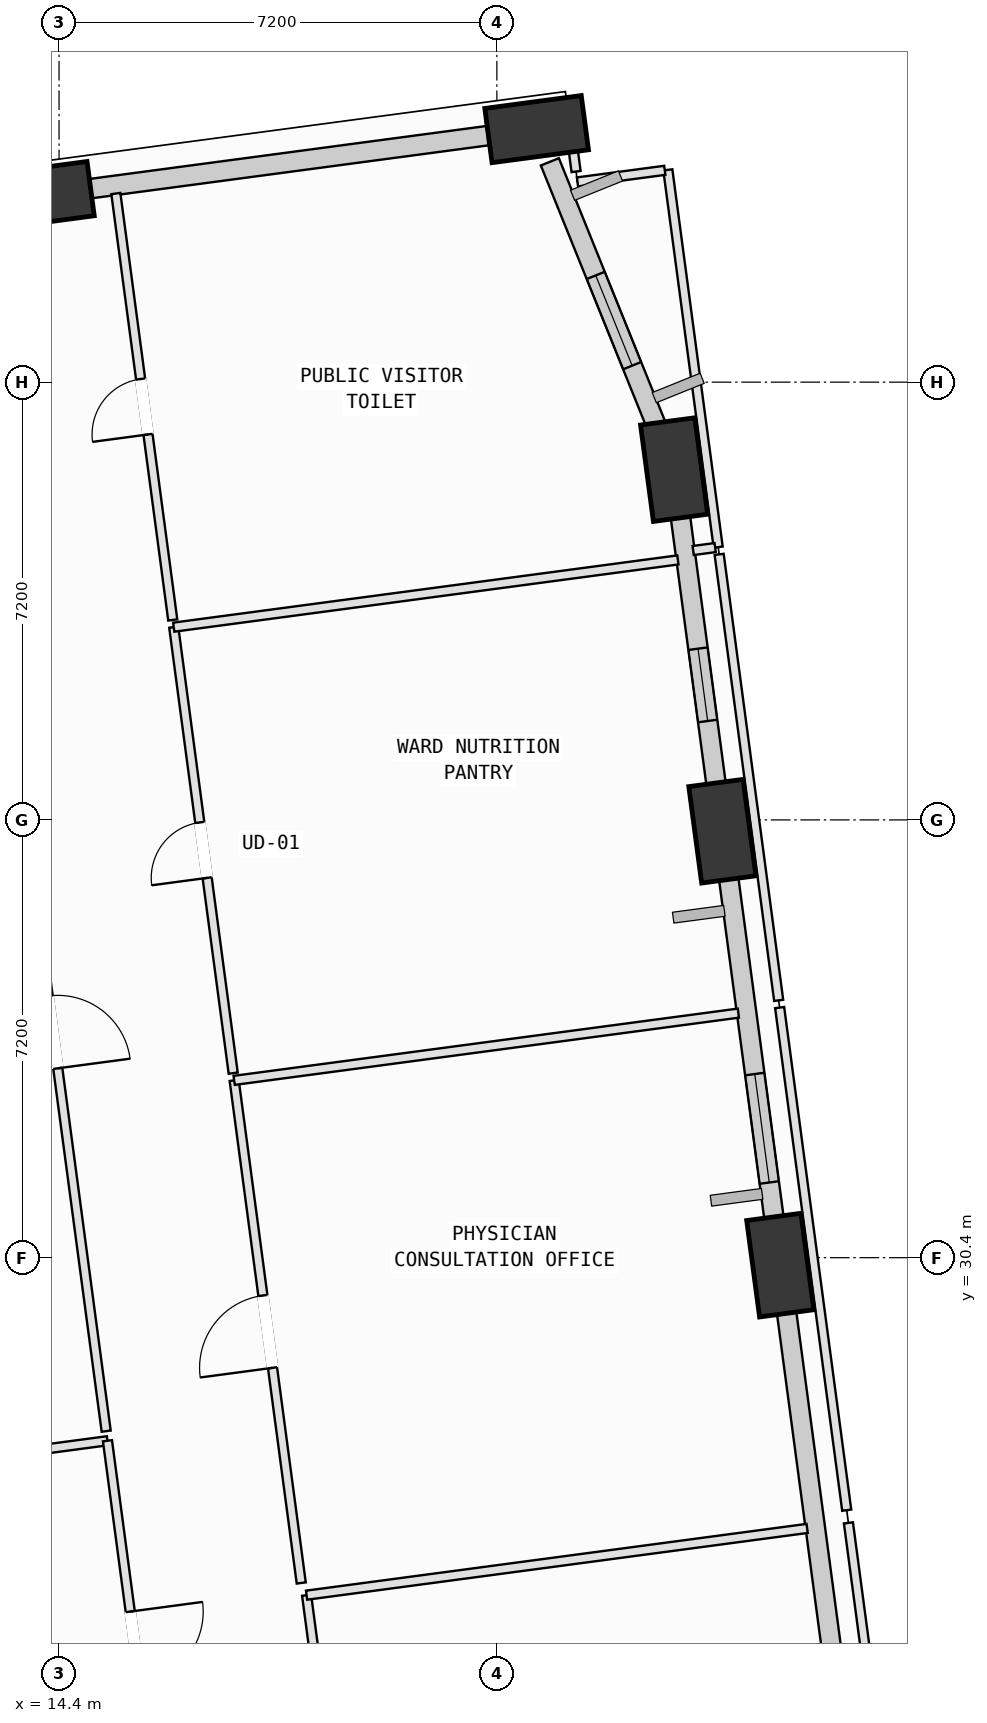
"""IFC4 building model, lengths in metres.
Left out: names, types, materials, properties, quantities, classifications, styles, units other than length and angle.
Written with IfcOpenShell. Run it as: python <this file> out.ifc"""

import sys

from ifc_helpers import new_model, si_unit, direction, frame, frame_2d, origin, origin_2d, place, context, subcontext, project, spatial, rectangle, extrude, element, fill, save


model = new_model("IFC4")
c1 = context("Model", 3, precision=1e-05, world=origin(), true_north=direction((0.0, 1.0)))
c2 = subcontext(c1, "Body", "Model", "MODEL_VIEW")
j1 = project(units=[si_unit("LENGTHUNIT", "METRE"), si_unit("PLANEANGLEUNIT", "RADIAN")], contexts=[c1])
p1 = place(None, origin())
s1 = spatial("IfcSite", under=j1, at=p1, CompositionType="ELEMENT")
p2 = place(p1, origin())
s2 = spatial("IfcBuilding", under=s1, at=p2, CompositionType="ELEMENT")
p3 = place(p2, frame((0.0, 0.0, 55.0)))
s3 = spatial("IfcBuildingStorey", under=s2, at=p3, CompositionType="ELEMENT", Elevation=55.0)
p4 = place(p3, frame((26.261, 30.277, 0.002), z_axis=(-0.022402943156, -0.030582764363, 0.999281142953), x_axis=(0.478639719495, 0.877206908707, 0.037577363367)))
e1 = element("IfcColumn", 1, at=p4, inside=s3, PredefinedType="COLUMN", context=c2, shape_type="SweptSolid", body=[
    extrude(rectangle(XDim=1.6, YDim=0.9, at=origin_2d()), origin(), (0.0, 0.0, 1.0), 4.0),
])
p5 = place(p3, frame((25.309, 37.414, 0.002), z_axis=(-0.051944682032, -0.034751723895, 0.998045123076), x_axis=(0.748695807383, 0.660012861468, 0.061948451981)))
e2 = element("IfcColumn", 2, at=p5, inside=s3, PredefinedType="COLUMN", context=c2, shape_type="SweptSolid", body=[
    extrude(rectangle(XDim=1.6, YDim=0.9, at=origin_2d()), origin(), (0.0, 0.0, 1.0), 4.004),
])
p6 = place(p3, frame((24.515, 43.362, 0.002), z_axis=(-0.076324130857, -0.038162065429, 0.99635248974), x_axis=(0.824189501878, 0.559961890476, 0.084583368398)))
e3 = element("IfcColumn", 3, at=p6, inside=s3, PredefinedType="COLUMN", context=c2, shape_type="SweptSolid", body=[
    extrude(rectangle(XDim=1.6, YDim=0.9, at=origin_2d()), origin(), (0.0, 0.0, 1.0), 4.011),
])
p7 = place(p3, frame((22.255, 48.962, 0.002), z_axis=(-0.099150741253, -0.047541353583, 0.9939360896), x_axis=(0.547089007496, -0.836948101272, 0.014542821377)))
e4 = element("IfcColumn", 4, at=p7, inside=s3, PredefinedType="COLUMN", context=c2, shape_type="SweptSolid", body=[
    extrude(rectangle(XDim=1.6, YDim=0.9, at=origin_2d()), origin(), (0.0, 0.0, 1.0), 4.021),
])
p8 = place(p3, frame((14.127, 47.877, 0.002), z_axis=(-0.0942550357, -0.080919918109, 0.992253977114), x_axis=(0.745242646619, -0.666590927141, 0.016429653498)))
e5 = element("IfcColumn", 5, at=p8, inside=s3, PredefinedType="COLUMN", context=c2, shape_type="SweptSolid", body=[
    extrude(rectangle(XDim=1.6, YDim=0.9, at=origin_2d()), origin(), (0.0, 0.0, 1.0), 4.028),
])
p9 = place(p3, frame((27.213, 23.144, 0.0), z_axis=(0.0, 0.0, 1.0), x_axis=(-0.132264032009, 0.991214520594, 0.0)))
e6 = element("IfcWall", 6, at=p9, inside=s3, PredefinedType="SOLIDWALL", context=c2, shape_type="SweptSolid", body=[
    extrude(rectangle(XDim=6.536, YDim=0.32, at=frame_2d((3.268, 0.0))), origin(), (0.0, 0.0, 1.0), 3.165),
])
p10 = place(p3, frame((26.188, 30.823, 0.0), z_axis=(0.0, 0.0, 1.0), x_axis=(-0.132238391297, 0.991217941659, 0.0)))
e7 = element("IfcWall", 7, at=p10, inside=s3, PredefinedType="SOLIDWALL", context=c2, shape_type="SweptSolid", body=[
    extrude(rectangle(XDim=5.997, YDim=0.32, at=frame_2d((2.998, 0.0))), origin(), (0.0, 0.0, 1.0), 3.165),
])
p11 = place(p10, frame((0.82, 0.0, 0.75)))
e8 = element("IfcOpeningElement", 8, at=p11, cuts=e7, PredefinedType="OPENING", context=c2, shape_type="SweptSolid", body=[
    extrude(rectangle(XDim=1.8, YDim=2.05, at=frame_2d((0.9, 1.025))), frame((0.0, 0.17, 0.0), z_axis=(0.0, -1.0, 0.0), x_axis=(1.0, 0.0, 0.0)), (0.0, 0.0, 1.0), 0.34),
])
p12 = place(p3, frame((25.237, 37.952, 0.0), z_axis=(0.0, 0.0, 1.0), x_axis=(-0.132253369946, 0.991215943242, 0.0)))
e9 = element("IfcWall", 9, at=p12, inside=s3, PredefinedType="SOLIDWALL", context=c2, shape_type="SweptSolid", body=[
    extrude(rectangle(XDim=4.816, YDim=0.32, at=frame_2d((2.408, 0.0))), origin(), (0.0, 0.0, 1.0), 3.165),
])
p13 = place(p12, frame((1.286, 0.0, 0.75)))
e10 = element("IfcOpeningElement", 10, at=p13, cuts=e9, PredefinedType="OPENING", context=c2, shape_type="SweptSolid", body=[
    extrude(rectangle(XDim=1.2, YDim=1.75, at=frame_2d((0.6, 0.875))), frame((0.0, 0.17, 0.0), z_axis=(0.0, -1.0, 0.0), x_axis=(1.0, 0.0, 0.0)), (0.0, 0.0, 1.0), 0.34),
])
p14 = place(p3, frame((22.472, 48.424, 0.0), z_axis=(0.0, 0.0, 1.0), x_axis=(0.374316080682, -0.927301176395, 0.0)))
e11 = element("IfcWall", 11, at=p14, inside=s3, PredefinedType="SOLIDWALL", context=c2, shape_type="SweptSolid", body=[
    extrude(rectangle(XDim=4.889, YDim=0.32, at=frame_2d((2.445, 0.0))), origin(), (0.0, 0.0, 1.0), 3.165),
])
p15 = place(p14, frame((2.015, 0.0, 0.75)))
e12 = element("IfcOpeningElement", 12, at=p15, cuts=e11, PredefinedType="OPENING", context=c2, shape_type="SweptSolid", body=[
    extrude(rectangle(XDim=1.6, YDim=1.95, at=frame_2d((0.8, 0.975))), frame((0.0, 0.17, 0.0), z_axis=(0.0, -1.0, 0.0), x_axis=(1.0, 0.0, 0.0)), (0.0, 0.0, 1.0), 0.34),
])
p16 = place(p3, frame((14.506, 47.928, 0.0), z_axis=(0.0, 0.0, 1.0), x_axis=(0.991218459324, 0.132234510981, 0.0)))
e13 = element("IfcWall", 13, at=p16, inside=s3, PredefinedType="SOLIDWALL", context=c2, shape_type="SweptSolid", body=[
    extrude(rectangle(XDim=7.003, YDim=0.32, at=frame_2d((3.501, 0.0))), origin(), (0.0, 0.0, 1.0), 3.165),
])
p17 = place(p3, frame((5.864, 26.143, 0.0), z_axis=(0.0, 0.0, 1.0), x_axis=(0.991205918813, 0.132328479586, 0.0)))
e14 = element("IfcWall", 14, at=p17, inside=s3, PredefinedType="PARTITIONING", context=c2, shape_type="SweptSolid", body=[
    extrude(rectangle(XDim=9.415, YDim=0.15, at=frame_2d((4.708, 0.0))), origin(), (0.0, 0.0, 1.0), 3.78),
])
p18 = place(p3, frame((15.196, 27.389, 0.0), z_axis=(0.0, 0.0, 1.0), x_axis=(0.132180016539, -0.991225727687, 0.0)))
e15 = element("IfcWall", 15, at=p18, inside=s3, PredefinedType="PARTITIONING", context=c2, shape_type="SweptSolid", body=[
    extrude(rectangle(XDim=6.869, YDim=0.15, at=frame_2d((3.435, 0.0))), origin(), (0.0, 0.0, 1.0), 3.78),
])
p19 = place(p18, frame((2.835, 0.0, 0.0)))
e16 = element("IfcOpeningElement", 16, at=p19, cuts=e15, PredefinedType="OPENING", context=c2, shape_type="SweptSolid", body=[
    extrude(rectangle(XDim=1.2, YDim=2.15, at=frame_2d((0.6, 1.075))), frame((0.0, 0.085, 0.0), z_axis=(0.0, -1.0, 0.0), x_axis=(1.0, 0.0, 0.0)), (0.0, 0.0, 1.0), 0.17),
])
p20 = place(p3, frame((13.424, 40.671, 0.0), z_axis=(0.0, 0.0, 1.0), x_axis=(0.132248267647, -0.991216624005, 0.0)))
e17 = element("IfcWall", 17, at=p20, inside=s3, PredefinedType="PARTITIONING", context=c2, shape_type="SweptSolid", body=[
    extrude(rectangle(XDim=13.24, YDim=0.15, at=frame_2d((6.62, 0.0))), origin(), (0.0, 0.0, 1.0), 2.865),
])
p21 = place(p20, frame((6.02, 0.0, 0.0)))
e18 = element("IfcOpeningElement", 18, at=p21, cuts=e17, PredefinedType="OPENING", context=c2, shape_type="SweptSolid", body=[
    extrude(rectangle(XDim=1.2, YDim=2.15, at=frame_2d((0.6, 1.075))), frame((0.0, 0.085, 0.0), z_axis=(0.0, -1.0, 0.0), x_axis=(1.0, 0.0, 0.0)), (0.0, 0.0, 1.0), 0.17),
])
p22 = place(p3, frame((19.04, 20.58, 0.0), z_axis=(0.0, 0.0, 1.0), x_axis=(-0.132137728125, 0.991231365931, 0.0)))
e19 = element("IfcWall", 19, at=p22, inside=s3, PredefinedType="PARTITIONING", context=c2, shape_type="SweptSolid", body=[
    extrude(rectangle(XDim=4.307, YDim=0.15, at=frame_2d((2.153, 0.0))), origin(), (0.0, 0.0, 1.0), 3.78),
])
p23 = place(p3, frame((18.471, 24.849, 0.0), z_axis=(0.0, 0.0, 1.0), x_axis=(0.991223021829, 0.13220030634, 0.0)))
e20 = element("IfcWall", 20, at=p23, inside=s3, PredefinedType="PARTITIONING", context=c2, shape_type="SweptSolid", body=[
    extrude(rectangle(XDim=8.305, YDim=0.15, at=frame_2d((4.152, 0.0))), origin(), (0.0, 0.0, 1.0), 3.78),
])
p24 = place(p3, frame((27.382, 26.038, 0.0), z_axis=(0.0, 0.0, 1.0), x_axis=(0.132253490455, -0.991215927163, 0.0)))
e21 = element("IfcWall", 21, at=p24, inside=s3, PredefinedType="PARTITIONING", context=c2, shape_type="SweptSolid", body=[
    extrude(rectangle(XDim=2.85, YDim=0.15, at=frame_2d((1.425, 0.0))), origin(), (0.0, 0.0, 1.0), 3.78),
])
p25 = place(p3, frame((27.759, 23.213, 0.0), z_axis=(0.0, 0.0, 1.0), x_axis=(0.991206665462, 0.132322886697, 0.0)))
e22 = element("IfcWall", 22, at=p25, inside=s3, PredefinedType="PARTITIONING", context=c2, shape_type="SweptSolid", body=[
    extrude(rectangle(XDim=14.367, YDim=0.15, at=frame_2d((7.184, 0.0))), origin(), (0.0, 0.0, 1.0), 3.165),
])
p26 = place(p3, frame((18.383, 25.05, 0.0), z_axis=(0.0, 0.0, 1.0), x_axis=(-0.132271109001, 0.991213576241, 0.0)))
e23 = element("IfcWall", 23, at=p26, inside=s3, PredefinedType="PARTITIONING", context=c2, shape_type="SweptSolid", body=[
    extrude(rectangle(XDim=8.339, YDim=0.15, at=frame_2d((4.169, 0.0))), origin(), (0.0, 0.0, 1.0), 3.78),
])
p27 = place(p26, frame((3.57, 0.0, 0.0)))
e24 = element("IfcOpeningElement", 24, at=p27, cuts=e23, PredefinedType="OPENING", context=c2, shape_type="SweptSolid", body=[
    extrude(rectangle(XDim=1.2, YDim=2.15, at=frame_2d((0.6, 1.075))), frame((0.0, 0.085, 0.0), z_axis=(0.0, -1.0, 0.0), x_axis=(1.0, 0.0, 0.0)), (0.0, 0.0, 1.0), 0.17),
])
p28 = place(p3, frame((17.28, 33.316, 0.0), z_axis=(0.0, 0.0, 1.0), x_axis=(0.991218467397, 0.13223445047, 0.0)))
e25 = element("IfcWall", 25, at=p28, inside=s3, PredefinedType="PARTITIONING", context=c2, shape_type="SweptSolid", body=[
    extrude(rectangle(XDim=8.365, YDim=0.15, at=frame_2d((4.183, 0.0))), origin(), (0.0, 0.0, 1.0), 3.78),
])
p29 = place(p3, frame((26.251, 34.513, 0.0), z_axis=(0.0, 0.0, 1.0), x_axis=(0.132271109001, -0.991213576241, 0.0)))
e26 = element("IfcWall", 26, at=p29, inside=s3, PredefinedType="PARTITIONING", context=c2, shape_type="SweptSolid", body=[
    extrude(rectangle(XDim=8.339, YDim=0.15, at=frame_2d((4.169, 0.0))), origin(), (0.0, 0.0, 1.0), 3.78),
])
p30 = place(p3, frame((17.264, 33.435, 0.0), z_axis=(0.0, 0.0, 1.0), x_axis=(-0.132168042254, 0.991227324385, 0.0)))
e27 = element("IfcWall", 27, at=p30, inside=s3, PredefinedType="PARTITIONING", context=c2, shape_type="SweptSolid", body=[
    extrude(rectangle(XDim=7.4, YDim=0.15, at=frame_2d((3.7, 0.0))), origin(), (0.0, 0.0, 1.0), 3.78),
])
p31 = place(p30, frame((3.24, 0.0, 0.0)))
e28 = element("IfcOpeningElement", 28, at=p31, cuts=e27, PredefinedType="OPENING", context=c2, shape_type="SweptSolid", body=[
    extrude(rectangle(XDim=0.92, YDim=2.1, at=frame_2d((0.46, 1.05))), frame((0.0, 0.085, 0.0), z_axis=(0.0, -1.0, 0.0), x_axis=(1.0, 0.0, 0.0)), (0.0, 0.0, 1.0), 0.17),
])
p32 = place(p3, frame((16.286, 40.77, 0.0), z_axis=(0.0, 0.0, 1.0), x_axis=(0.991220251545, 0.132221075957, 0.0)))
e29 = element("IfcWall", 29, at=p32, inside=s3, PredefinedType="PARTITIONING", context=c2, shape_type="SweptSolid", body=[
    extrude(rectangle(XDim=8.365, YDim=0.15, at=frame_2d((4.182, 0.0))), origin(), (0.0, 0.0, 1.0), 3.78),
])
p33 = place(p3, frame((25.256, 41.967, 0.0), z_axis=(0.0, 0.0, 1.0), x_axis=(0.132297703643, -0.991210026993, 0.0)))
e30 = element("IfcWall", 30, at=p33, inside=s3, PredefinedType="PARTITIONING", context=c2, shape_type="SweptSolid", body=[
    extrude(rectangle(XDim=7.4, YDim=0.15, at=frame_2d((3.7, 0.0))), origin(), (0.0, 0.0, 1.0), 3.78),
])
p34 = place(p3, frame((24.412, 48.291, 0.0), z_axis=(0.0, 0.0, 1.0), x_axis=(0.132248020299, -0.991216657006, 0.0)))
e31 = element("IfcWall", 31, at=p34, inside=s3, PredefinedType="PARTITIONING", context=c2, shape_type="SweptSolid", body=[
    extrude(rectangle(XDim=6.26, YDim=0.15, at=frame_2d((3.13, 0.0))), origin(), (0.0, 0.0, 1.0), 3.78),
])
p35 = place(p3, frame((25.19, 42.079, 0.0), z_axis=(0.0, 0.0, 1.0), x_axis=(-0.991233756992, -0.132119790343, 0.0)))
e32 = element("IfcWall", 32, at=p35, inside=s3, PredefinedType="PARTITIONING", context=c2, shape_type="SweptSolid", body=[
    extrude(rectangle(XDim=0.364, YDim=0.15, at=frame_2d((0.182, 0.0))), origin(), (0.0, 0.0, 1.0), 3.78),
])
p36 = place(p3, frame((16.27, 40.889, 0.0), z_axis=(0.0, 0.0, 1.0), x_axis=(-0.132294810416, 0.99121041315, 0.0)))
e33 = element("IfcWall", 33, at=p36, inside=s3, PredefinedType="PARTITIONING", context=c2, shape_type="SweptSolid", body=[
    extrude(rectangle(XDim=7.075, YDim=0.15, at=frame_2d((3.538, 0.0))), origin(), (0.0, 0.0, 1.0), 3.78),
])
p37 = place(p36, frame((3.078, 0.0, 0.0)))
e34 = element("IfcOpeningElement", 34, at=p37, cuts=e33, PredefinedType="OPENING", context=c2, shape_type="SweptSolid", body=[
    extrude(rectangle(XDim=0.92, YDim=2.1, at=frame_2d((0.46, 1.05))), frame((0.0, 0.085, 0.0), z_axis=(0.0, -1.0, 0.0), x_axis=(1.0, 0.0, 0.0)), (0.0, 0.0, 1.0), 0.17),
])
p38 = place(p3, frame((21.422, 49.042, 0.0), z_axis=(0.0, 0.0, 1.0), x_axis=(0.991176270219, 0.132550372899, 0.0)))
e35 = element("IfcWall", 35, at=p38, inside=s3, PredefinedType="PARTITIONING", context=c2, shape_type="SweptSolid", body=[
    extrude(rectangle(XDim=1.365, YDim=0.15, at=frame_2d((0.682, 0.0))), origin(), (0.0, 0.0, 1.0), 3.165),
])
p39 = place(p3, frame((22.782, 49.173, 0.0), z_axis=(0.0, 0.0, 1.0), x_axis=(0.132024236915, -0.991246488451, 0.0)))
e36 = element("IfcWall", 36, at=p39, inside=s3, PredefinedType="PARTITIONING", context=c2, shape_type="SweptSolid", body=[
    extrude(rectangle(XDim=0.917, YDim=0.15, at=frame_2d((0.458, 0.0))), origin(), (0.0, 0.0, 1.0), 3.78),
])
p40 = place(p3, frame((22.926, 48.093, 0.0), z_axis=(0.0, 0.0, 1.0), x_axis=(0.991277872682, 0.131788387698, 0.0)))
e37 = element("IfcWall", 37, at=p40, inside=s3, PredefinedType="PARTITIONING", context=c2, shape_type="SweptSolid", body=[
    extrude(rectangle(XDim=1.449, YDim=0.15, at=frame_2d((0.724, 0.0))), origin(), (0.0, 0.0, 1.0), 3.78),
])
p41 = place(p11, origin())
e38 = element("IfcWindow", 38, at=p41, inside=s3, PartitioningType="SINGLE_PANEL", PredefinedType="WINDOW", context=c2, shape_type="SweptSolid", body=[
    extrude(rectangle(XDim=1.8, YDim=2.05, at=frame_2d((0.9, 1.025))), frame((0.0, 0.03, 0.0), z_axis=(0.0, -1.0, 0.0), x_axis=(1.0, 0.0, 0.0)), (0.0, 0.0, 1.0), 0.06),
])
fill(e8, e38)
p42 = place(p13, origin())
e39 = element("IfcWindow", 39, at=p42, inside=s3, PartitioningType="SINGLE_PANEL", PredefinedType="WINDOW", context=c2, shape_type="SweptSolid", body=[
    extrude(rectangle(XDim=1.2, YDim=1.75, at=frame_2d((0.6, 0.875))), frame((0.0, 0.03, 0.0), z_axis=(0.0, -1.0, 0.0), x_axis=(1.0, 0.0, 0.0)), (0.0, 0.0, 1.0), 0.06),
])
fill(e10, e39)
p43 = place(p15, origin())
e40 = element("IfcWindow", 40, at=p43, inside=s3, PartitioningType="SINGLE_PANEL", PredefinedType="WINDOW", context=c2, shape_type="SweptSolid", body=[
    extrude(rectangle(XDim=1.6, YDim=1.95, at=frame_2d((0.8, 0.975))), frame((0.0, 0.03, 0.0), z_axis=(0.0, -1.0, 0.0), x_axis=(1.0, 0.0, 0.0)), (0.0, 0.0, 1.0), 0.06),
])
fill(e12, e40)
p44 = place(p19, origin())
e41 = element("IfcDoor", 41, at=p44, inside=s3, OperationType="SINGLE_SWING_LEFT", PredefinedType="DOOR", context=c2, shape_type="SweptSolid", body=[
    extrude(rectangle(XDim=1.2, YDim=2.15, at=frame_2d((0.6, 1.075))), frame((0.0, 0.025, 0.0), z_axis=(0.0, -1.0, 0.0), x_axis=(1.0, 0.0, 0.0)), (0.0, 0.0, 1.0), 0.05),
])
fill(e16, e41)
p45 = place(p21, origin())
e42 = element("IfcDoor", 42, at=p45, inside=s3, OperationType="SINGLE_SWING_RIGHT", PredefinedType="DOOR", context=c2, shape_type="SweptSolid", body=[
    extrude(rectangle(XDim=1.2, YDim=2.15, at=frame_2d((0.6, 1.075))), frame((0.0, 0.025, 0.0), z_axis=(0.0, -1.0, 0.0), x_axis=(1.0, 0.0, 0.0)), (0.0, 0.0, 1.0), 0.05),
])
fill(e18, e42)
p46 = place(p27, origin())
e43 = element("IfcDoor", 43, at=p46, inside=s3, OperationType="SINGLE_SWING_LEFT", PredefinedType="DOOR", context=c2, shape_type="SweptSolid", body=[
    extrude(rectangle(XDim=1.2, YDim=2.15, at=frame_2d((0.6, 1.075))), frame((0.0, 0.025, 0.0), z_axis=(0.0, -1.0, 0.0), x_axis=(1.0, 0.0, 0.0)), (0.0, 0.0, 1.0), 0.05),
])
fill(e24, e43)
p47 = place(p31, origin())
e44 = element("IfcDoor", 44, at=p47, inside=s3, OperationType="SINGLE_SWING_LEFT", PredefinedType="DOOR", context=c2, shape_type="SweptSolid", body=[
    extrude(rectangle(XDim=0.92, YDim=2.1, at=frame_2d((0.46, 1.05))), frame((0.0, 0.025, 0.0), z_axis=(0.0, -1.0, 0.0), x_axis=(1.0, 0.0, 0.0)), (0.0, 0.0, 1.0), 0.05),
])
fill(e28, e44)
p48 = place(p37, origin())
e45 = element("IfcDoor", 45, at=p48, inside=s3, OperationType="SINGLE_SWING_LEFT", PredefinedType="DOOR", context=c2, shape_type="SweptSolid", body=[
    extrude(rectangle(XDim=0.92, YDim=2.1, at=frame_2d((0.46, 1.05))), frame((0.0, 0.025, 0.0), z_axis=(0.0, -1.0, 0.0), x_axis=(1.0, 0.0, 0.0)), (0.0, 0.0, 1.0), 0.05),
])
fill(e34, e45)
save(model, sys.argv[1])
